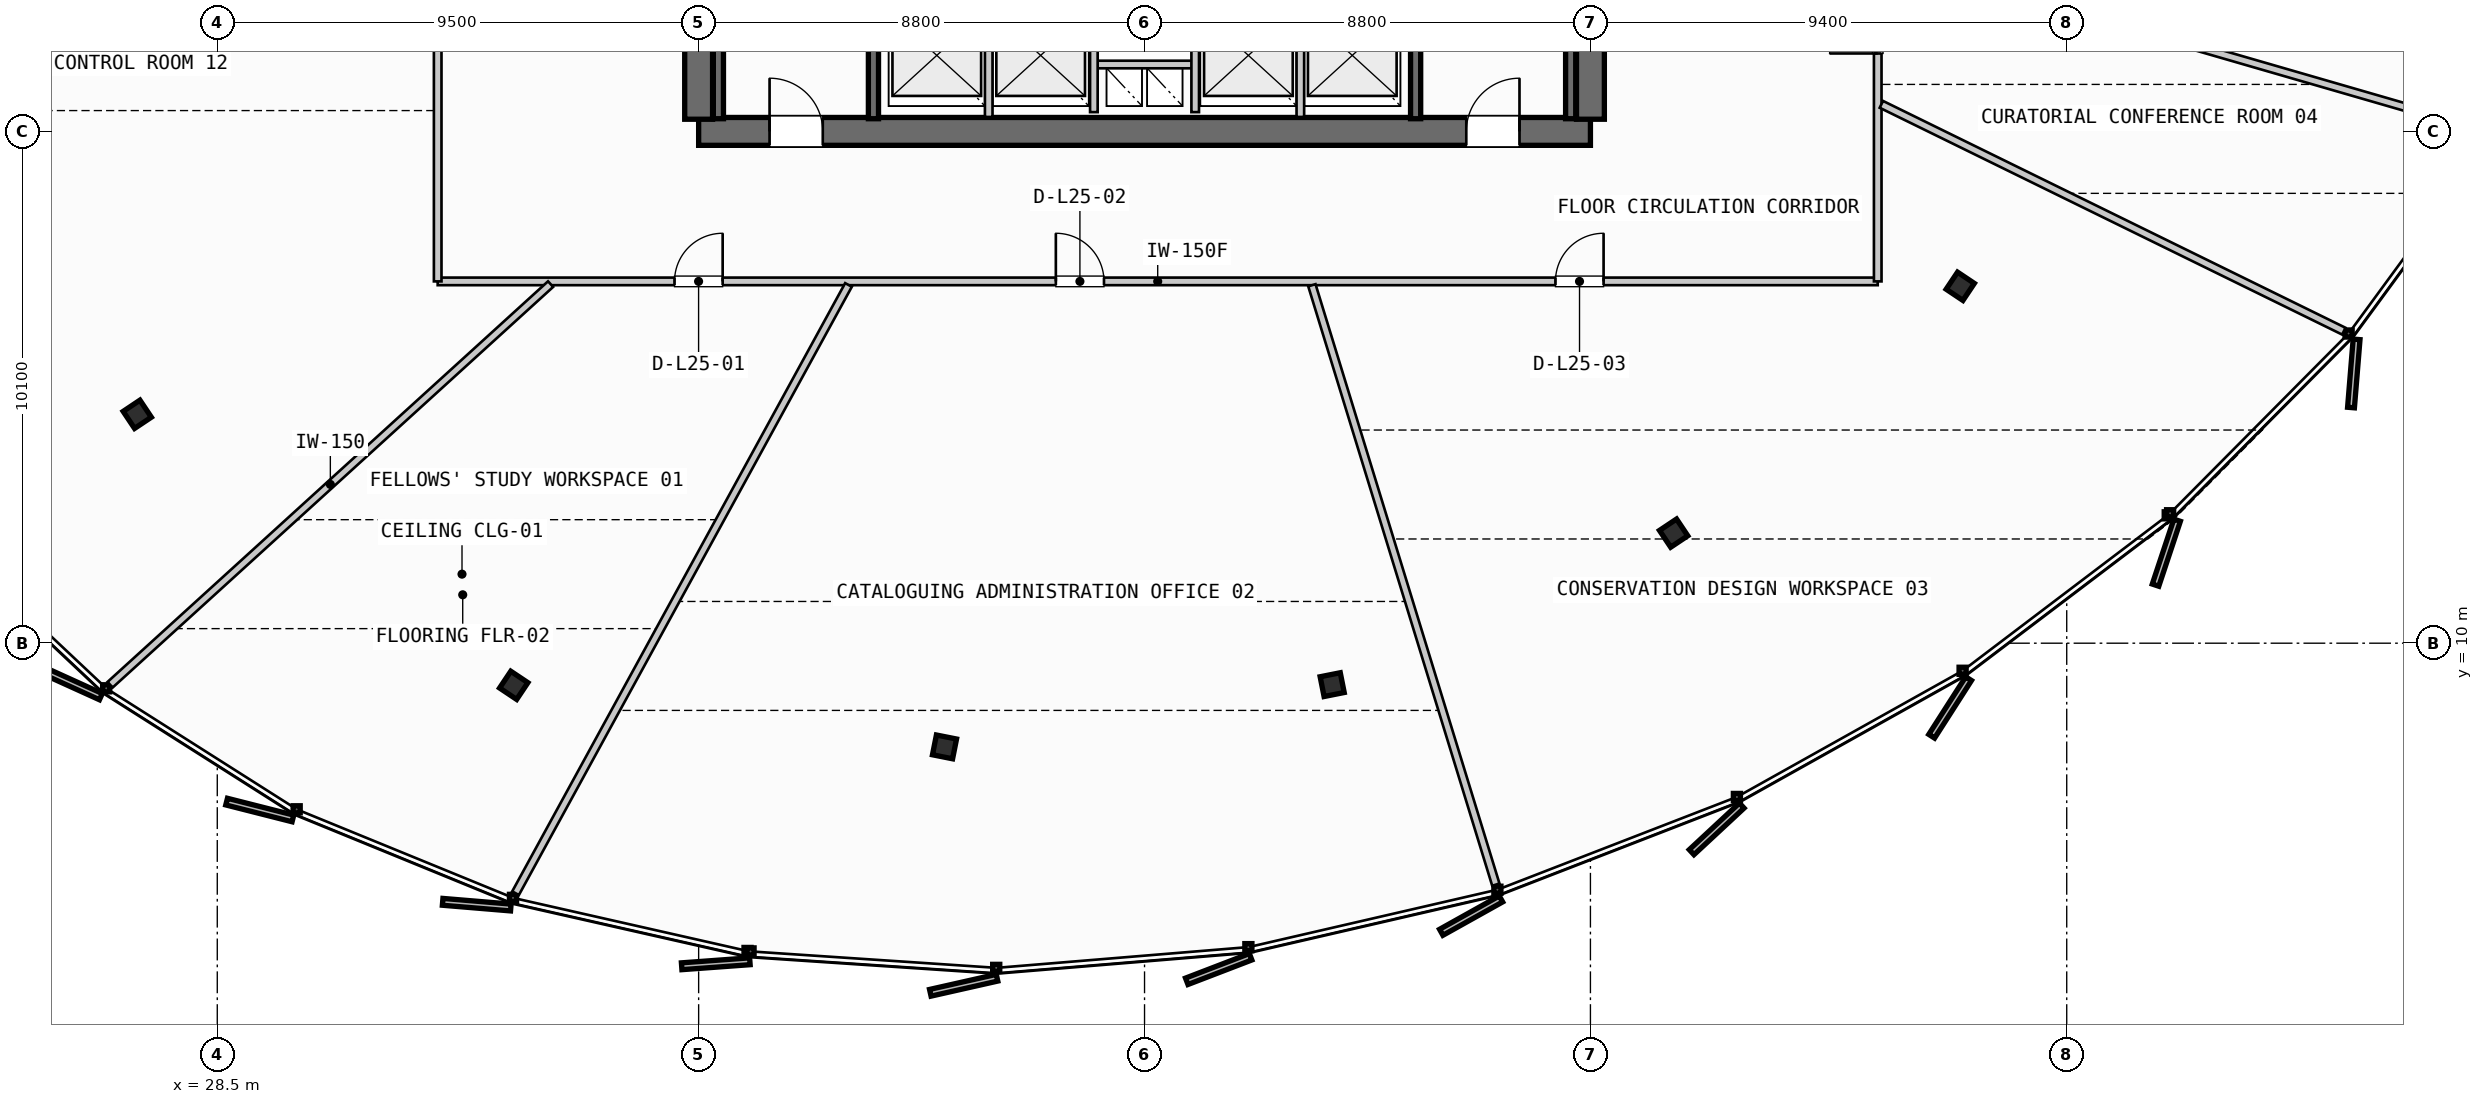
"""IFC4 building model, lengths in metres.
Left out: names, types, materials, properties, quantities, classifications, styles, units other than length and angle.
Written with IfcOpenShell. Run it as: python <this file> out.ifc"""

import sys

from ifc_helpers import new_model, si_unit, direction, frame, frame_2d, origin, origin_2d, place, context, subcontext, project, spatial, rectangle, i_section, extrude, source, transform, mapped, element, fill, save


model = new_model("IFC4")
c1 = context("Model", 3, precision=1e-05, world=origin(), true_north=direction((0.0, 1.0)))
c2 = subcontext(c1, "Body", "Model", "MODEL_VIEW")
j1 = project(units=[si_unit("LENGTHUNIT", "METRE"), si_unit("PLANEANGLEUNIT", "RADIAN")], contexts=[c1])
p1 = place(None, origin())
s1 = spatial("IfcSite", under=j1, at=p1, CompositionType="ELEMENT")
p2 = place(p1, origin())
s2 = spatial("IfcBuilding", under=s1, at=p2, CompositionType="ELEMENT")
p3 = place(p2, frame((0.0, 0.0, 103.6)))
s3 = spatial("IfcBuildingStorey", under=s2, at=p3, CompositionType="ELEMENT", Elevation=103.6)
p4 = place(p3, frame((38.0, 20.1, 0.0), z_axis=(0.0, 0.0, 1.0), x_axis=(1.0, 0.0, 0.0)))
e1 = element("IfcWall", 1, at=p4, inside=s3, PredefinedType="SHEAR", context=c2, shape_type="SweptSolid", body=[
    extrude(rectangle(XDim=17.6, YDim=0.55, at=frame_2d((8.8, 0.0))), origin(), (0.0, 0.0, 1.0), 3.35),
])
p5 = place(p4, frame((1.4, 0.0, 0.0)))
e2 = element("IfcOpeningElement", 2, at=p5, cuts=e1, PredefinedType="OPENING", context=c2, shape_type="SweptSolid", body=[
    extrude(rectangle(XDim=1.05, YDim=2.15, at=frame_2d((0.525, 1.075))), frame((0.0, 0.285, 0.0), z_axis=(0.0, -1.0, 0.0), x_axis=(1.0, 0.0, 0.0)), (0.0, 0.0, 1.0), 0.57),
])
p6 = place(p4, frame((15.15, 0.0, 0.0)))
e3 = element("IfcOpeningElement", 3, at=p6, cuts=e1, PredefinedType="OPENING", context=c2, shape_type="SweptSolid", body=[
    extrude(rectangle(XDim=1.05, YDim=2.15, at=frame_2d((0.525, 1.075))), frame((0.0, 0.285, 0.0), z_axis=(0.0, -1.0, 0.0), x_axis=(1.0, 0.0, 0.0)), (0.0, 0.0, 1.0), 0.57),
])
p7 = place(p3, frame((38.0, 35.26, 0.0), z_axis=(0.0, 0.0, 1.0), x_axis=(0.0, -1.0, 0.0)))
e4 = element("IfcWall", 4, at=p7, inside=s3, PredefinedType="SHEAR", context=c2, shape_type="SweptSolid", body=[
    extrude(rectangle(XDim=14.92, YDim=0.55, at=frame_2d((7.46, 0.0))), origin(), (0.0, 0.0, 1.0), 3.35),
])
p8 = place(p7, frame((5.21, 0.0, 0.0)))
e5 = element("IfcOpeningElement", 5, at=p8, cuts=e4, PredefinedType="OPENING", context=c2, shape_type="SweptSolid", body=[
    extrude(rectangle(XDim=1.1, YDim=2.2, at=frame_2d((0.55, 1.1))), frame((0.0, 0.285, 0.0), z_axis=(0.0, -1.0, 0.0), x_axis=(1.0, 0.0, 0.0)), (0.0, 0.0, 1.0), 0.57),
])
p9 = place(p3, frame((55.6, 20.34, 0.0), z_axis=(0.0, 0.0, 1.0), x_axis=(0.0, 1.0, 0.0)))
e6 = element("IfcWall", 6, at=p9, inside=s3, PredefinedType="SHEAR", context=c2, shape_type="SweptSolid", body=[
    extrude(rectangle(XDim=14.92, YDim=0.55, at=frame_2d((7.46, 0.0))), origin(), (0.0, 0.0, 1.0), 3.35),
])
p10 = place(p9, frame((12.71, 0.0, 0.0)))
e7 = element("IfcOpeningElement", 7, at=p10, cuts=e6, PredefinedType="OPENING", context=c2, shape_type="SweptSolid", body=[
    extrude(rectangle(XDim=1.05, YDim=2.15, at=frame_2d((0.525, 1.075))), frame((0.0, 0.285, 0.0), z_axis=(0.0, -1.0, 0.0), x_axis=(1.0, 0.0, 0.0)), (0.0, 0.0, 1.0), 0.57),
])
p11 = place(p9, frame((8.61, 0.0, 0.0)))
e8 = element("IfcOpeningElement", 8, at=p11, cuts=e6, PredefinedType="OPENING", context=c2, shape_type="SweptSolid", body=[
    extrude(rectangle(XDim=1.1, YDim=2.2, at=frame_2d((0.55, 1.1))), frame((0.0, 0.285, 0.0), z_axis=(0.0, -1.0, 0.0), x_axis=(1.0, 0.0, 0.0)), (0.0, 0.0, 1.0), 0.57),
])
m1 = source(origin(), c2, "Body", "SweptSolid", [
    extrude(i_section(OverallWidth=0.405, OverallDepth=0.398, WebThickness=0.035, FlangeThickness=0.056, FilletRadius=0.015, at=origin_2d()), origin(), (0.0, 0.0, 1.0), 3.35),
])
for number, where, z_axis, x_axis in (
    (9, (26.921, 14.517, 0.0), (0.0, 0.0, 1.0), (-0.831, -0.556, 0.0)),
    (10, (34.351, 9.168, 0.0), (0.0, 0.0, 1.0), (-0.556, -0.831, 0.0)),
    (11, (42.852, 7.954, 0.0), (0.0, 0.0, 1.0), (-0.195, -0.981, 0.0)),
    (12, (50.503, 9.182, 0.0), (0.0, 0.0, 1.0), (0.195, -0.981, 0.0)),
    (13, (57.242, 12.172, 0.0), (0.0, 0.0, 1.0), (0.556, -0.831, 0.0)),
    (14, (62.899, 17.043, 0.0), (0.0, 0.0, 1.0), (0.831, -0.556, 0.0)),
):
    element("IfcColumn", number, at=place(p3, frame(where, z_axis=z_axis, x_axis=x_axis)), inside=s3, PredefinedType="COLUMN", context=c2, shape_type="MappedRepresentation", body=[
        mapped(m1, transform((0.0, 0.0, 0.0), scale=1.0)),
    ])
for number, where, z_axis, x_axis in (
    (15, (41.45, 27.7, 0.0), (0.0, 0.0, 1.0), (0.0, -1.0, 0.0)),
    (16, (38.39, 20.35, 0.0), (0.0, 0.0, 1.0), (0.0, 1.0, 0.0)),
    (17, (55.21, 27.7, 0.0), (0.0, 0.0, 1.0), (0.0, -1.0, 0.0)),
    (18, (52.15, 20.35, 0.0), (0.0, 0.0, 1.0), (0.0, 1.0, 0.0)),
):
    element("IfcWall", number, at=place(p3, frame(where, z_axis=z_axis, x_axis=x_axis)), inside=s3, PredefinedType="SHEAR", context=c2, shape_type="SweptSolid", body=[
        extrude(rectangle(XDim=7.35, YDim=0.2, at=frame_2d((3.675, 0.0))), origin(), (0.0, 0.0, 1.0), 3.35),
    ])
p12 = place(p3, frame((45.8, 21.42, 0.0), z_axis=(0.0, 0.0, 1.0), x_axis=(1.0, 0.0, 0.0)))
e19 = element("IfcWall", 19, at=p12, inside=s3, PredefinedType="PARTITIONING", context=c2, shape_type="SweptSolid", body=[
    extrude(rectangle(XDim=2.0, YDim=0.15, at=frame_2d((1.0, 0.0))), origin(), (0.0, 0.0, 1.0), 2.28),
])
for number, where, z_axis, x_axis in (
    (20, (45.8, 20.48, 0.0), (0.0, 0.0, 1.0), (0.0, 1.0, 0.0)),
    (21, (47.8, 20.48, 0.0), (0.0, 0.0, 1.0), (0.0, 1.0, 0.0)),
):
    element("IfcWall", number, at=place(p3, frame(where, z_axis=z_axis, x_axis=x_axis)), inside=s3, PredefinedType="PARTITIONING", context=c2, shape_type="SweptSolid", body=[
        extrude(rectangle(XDim=2.24, YDim=0.15, at=frame_2d((1.12, 0.0))), origin(), (0.0, 0.0, 1.0), 2.28),
    ])
for number, where, z_axis, x_axis in (
    (22, (43.725, 20.385, 0.0), (0.0, 0.0, 1.0), (0.0, 1.0, 0.0)),
    (23, (49.875, 20.385, 0.0), (0.0, 0.0, 1.0), (0.0, 1.0, 0.0)),
):
    element("IfcWall", number, at=place(p3, frame(where, z_axis=z_axis, x_axis=x_axis)), inside=s3, PredefinedType="PARTITIONING", context=c2, shape_type="SweptSolid", body=[
        extrude(rectangle(XDim=2.345, YDim=0.15, at=frame_2d((1.172, 0.0))), origin(), (0.0, 0.0, 1.0), 2.28),
    ])
p13 = place(p3, frame((32.85, 17.14, 0.0), z_axis=(0.0, 0.0, 1.0), x_axis=(1.0, 0.0, 0.0)))
e24 = element("IfcWall", 24, at=p13, inside=s3, PredefinedType="PARTITIONING", context=c2, shape_type="SweptSolid", body=[
    extrude(rectangle(XDim=28.42, YDim=0.15, at=frame_2d((14.21, 0.0))), origin(), (0.0, 0.0, 1.0), 2.28),
])
p14 = place(p13, frame((4.674, 0.0, 0.0)))
e25 = element("IfcOpeningElement", 25, at=p14, cuts=e24, PredefinedType="OPENING", context=c2, shape_type="SweptSolid", body=[
    extrude(rectangle(XDim=0.95, YDim=2.15, at=frame_2d((0.475, 1.075))), frame((0.0, 0.085, 0.0), z_axis=(0.0, -1.0, 0.0), x_axis=(1.0, 0.0, 0.0)), (0.0, 0.0, 1.0), 0.17),
])
p15 = place(p13, frame((12.2, 0.0, 0.0)))
e26 = element("IfcOpeningElement", 26, at=p15, cuts=e24, PredefinedType="OPENING", context=c2, shape_type="SweptSolid", body=[
    extrude(rectangle(XDim=0.95, YDim=2.15, at=frame_2d((0.475, 1.075))), frame((0.0, 0.085, 0.0), z_axis=(0.0, -1.0, 0.0), x_axis=(1.0, 0.0, 0.0)), (0.0, 0.0, 1.0), 0.17),
])
p16 = place(p13, frame((22.06, 0.0, 0.0)))
e27 = element("IfcOpeningElement", 27, at=p16, cuts=e24, PredefinedType="OPENING", context=c2, shape_type="SweptSolid", body=[
    extrude(rectangle(XDim=0.95, YDim=2.15, at=frame_2d((0.475, 1.075))), frame((0.0, 0.085, 0.0), z_axis=(0.0, -1.0, 0.0), x_axis=(1.0, 0.0, 0.0)), (0.0, 0.0, 1.0), 0.17),
])
p17 = place(p3, frame((61.27, 17.14, 0.0), z_axis=(0.0, 0.0, 1.0), x_axis=(0.0, 1.0, 0.0)))
e28 = element("IfcWall", 28, at=p17, inside=s3, PredefinedType="PARTITIONING", context=c2, shape_type="SweptSolid", body=[
    extrude(rectangle(XDim=20.48, YDim=0.15, at=frame_2d((10.24, 0.0))), origin(), (0.0, 0.0, 1.0), 2.28),
])
p18 = place(p17, frame((4.498, 0.0, 0.0)))
e29 = element("IfcOpeningElement", 29, at=p18, cuts=e28, PredefinedType="OPENING", context=c2, shape_type="SweptSolid", body=[
    extrude(rectangle(XDim=0.95, YDim=2.15, at=frame_2d((0.475, 1.075))), frame((0.0, 0.085, 0.0), z_axis=(0.0, -1.0, 0.0), x_axis=(1.0, 0.0, 0.0)), (0.0, 0.0, 1.0), 0.17),
])
p19 = place(p17, frame((8.253, 0.0, 0.0)))
e30 = element("IfcOpeningElement", 30, at=p19, cuts=e28, PredefinedType="OPENING", context=c2, shape_type="SweptSolid", body=[
    extrude(rectangle(XDim=0.95, YDim=2.15, at=frame_2d((0.475, 1.075))), frame((0.0, 0.085, 0.0), z_axis=(0.0, -1.0, 0.0), x_axis=(1.0, 0.0, 0.0)), (0.0, 0.0, 1.0), 0.17),
])
p20 = place(p17, frame((14.984, 0.0, 0.0)))
e31 = element("IfcOpeningElement", 31, at=p20, cuts=e28, PredefinedType="OPENING", context=c2, shape_type="SweptSolid", body=[
    extrude(rectangle(XDim=0.95, YDim=2.15, at=frame_2d((0.475, 1.075))), frame((0.0, 0.085, 0.0), z_axis=(0.0, -1.0, 0.0), x_axis=(1.0, 0.0, 0.0)), (0.0, 0.0, 1.0), 0.17),
])
p21 = place(p3, frame((32.85, 37.62, 0.0), z_axis=(0.0, 0.0, 1.0), x_axis=(0.0, -1.0, 0.0)))
e32 = element("IfcWall", 32, at=p21, inside=s3, PredefinedType="PARTITIONING", context=c2, shape_type="SweptSolid", body=[
    extrude(rectangle(XDim=20.48, YDim=0.15, at=frame_2d((10.24, 0.0))), origin(), (0.0, 0.0, 1.0), 2.28),
])
p22 = place(p21, frame((4.729, 0.0, 0.0)))
e33 = element("IfcOpeningElement", 33, at=p22, cuts=e32, PredefinedType="OPENING", context=c2, shape_type="SweptSolid", body=[
    extrude(rectangle(XDim=0.95, YDim=2.15, at=frame_2d((0.475, 1.075))), frame((0.0, 0.085, 0.0), z_axis=(0.0, -1.0, 0.0), x_axis=(1.0, 0.0, 0.0)), (0.0, 0.0, 1.0), 0.17),
])
p23 = place(p21, frame((13.375, 0.0, 0.0)))
e34 = element("IfcOpeningElement", 34, at=p23, cuts=e32, PredefinedType="OPENING", context=c2, shape_type="SweptSolid", body=[
    extrude(rectangle(XDim=0.95, YDim=2.15, at=frame_2d((0.475, 1.075))), frame((0.0, 0.085, 0.0), z_axis=(0.0, -1.0, 0.0), x_axis=(1.0, 0.0, 0.0)), (0.0, 0.0, 1.0), 0.17),
])
p24 = place(p3, frame((35.078, 17.086, 0.0), z_axis=(0.0, 0.0, 1.0), x_axis=(-0.739815961322, -0.672809291979, 0.0)))
e35 = element("IfcWall", 35, at=p24, inside=s3, PredefinedType="PARTITIONING", context=c2, shape_type="SweptSolid", body=[
    extrude(rectangle(XDim=11.75, YDim=0.15, at=frame_2d((5.875, 0.0))), origin(), (0.0, 0.0, 1.0), 2.28),
])
p25 = place(p3, frame((40.958, 17.07, 0.0), z_axis=(0.0, 0.0, 1.0), x_axis=(-0.480174097986, -0.877173207311, 0.0)))
e36 = element("IfcWall", 36, at=p25, inside=s3, PredefinedType="PARTITIONING", context=c2, shape_type="SweptSolid", body=[
    extrude(rectangle(XDim=13.684, YDim=0.15, at=frame_2d((6.842, 0.0))), origin(), (0.0, 0.0, 1.0), 2.28),
])
p26 = place(p3, frame((50.103, 17.063, 0.0), z_axis=(0.0, 0.0, 1.0), x_axis=(0.293429940937, -0.955980580222, 0.0)))
e37 = element("IfcWall", 37, at=p26, inside=s3, PredefinedType="PARTITIONING", context=c2, shape_type="SweptSolid", body=[
    extrude(rectangle(XDim=12.373, YDim=0.15, at=frame_2d((6.187, 0.0))), origin(), (0.0, 0.0, 1.0), 2.28),
])
p27 = place(p3, frame((61.342, 20.634, 0.0), z_axis=(0.0, 0.0, 1.0), x_axis=(0.897844588606, -0.440312496656, 0.0)))
e38 = element("IfcWall", 38, at=p27, inside=s3, PredefinedType="PARTITIONING", context=c2, shape_type="SweptSolid", body=[
    extrude(rectangle(XDim=10.166, YDim=0.15, at=frame_2d((5.083, 0.0))), origin(), (0.0, 0.0, 1.0), 2.28),
])
p28 = place(p3, frame((61.347, 23.567, 0.0), z_axis=(0.0, 0.0, 1.0), x_axis=(0.960628313882, -0.277836719259, 0.0)))
e39 = element("IfcWall", 39, at=p28, inside=s3, PredefinedType="PARTITIONING", context=c2, shape_type="SweptSolid", body=[
    extrude(rectangle(XDim=12.507, YDim=0.15, at=frame_2d((6.253, 0.0))), origin(), (0.0, 0.0, 1.0), 2.28),
])
m2 = source(origin(), c2, "Body", "SweptSolid", [
    extrude(rectangle(XDim=1.05, YDim=2.15, at=frame_2d((0.525, 1.075))), frame((0.0, 0.025, 0.0), z_axis=(0.0, -1.0, 0.0), x_axis=(1.0, 0.0, 0.0)), (0.0, 0.0, 1.0), 0.05),
])
p29 = place(p5, origin())
e40 = element("IfcDoor", 40, at=p29, inside=s3, OperationType="SINGLE_SWING_LEFT", PredefinedType="DOOR", context=c2, shape_type="MappedRepresentation", body=[
    mapped(m2, transform((0.0, 0.0, 0.0), scale=1.0)),
])
fill(e2, e40)
p30 = place(p6, origin())
e41 = element("IfcDoor", 41, at=p30, inside=s3, OperationType="SINGLE_SWING_RIGHT", PredefinedType="DOOR", context=c2, shape_type="MappedRepresentation", body=[
    mapped(m2, transform((0.0, 0.0, 0.0), scale=1.0)),
])
fill(e3, e41)
m3 = source(origin(), c2, "Body", "SweptSolid", [
    extrude(rectangle(XDim=0.95, YDim=2.15, at=frame_2d((0.475, 1.075))), frame((0.0, 0.025, 0.0), z_axis=(0.0, -1.0, 0.0), x_axis=(1.0, 0.0, 0.0)), (0.0, 0.0, 1.0), 0.05),
])
p31 = place(p14, origin())
e42 = element("IfcDoor", 42, at=p31, inside=s3, OperationType="SINGLE_SWING_RIGHT", PredefinedType="DOOR", context=c2, shape_type="MappedRepresentation", body=[
    mapped(m3, transform((0.0, 0.0, 0.0), scale=1.0)),
])
fill(e25, e42)
p32 = place(p15, origin())
e43 = element("IfcDoor", 43, at=p32, inside=s3, OperationType="SINGLE_SWING_LEFT", PredefinedType="DOOR", context=c2, shape_type="MappedRepresentation", body=[
    mapped(m3, transform((0.0, 0.0, 0.0), scale=1.0)),
])
fill(e26, e43)
p33 = place(p16, origin())
e44 = element("IfcDoor", 44, at=p33, inside=s3, OperationType="SINGLE_SWING_RIGHT", PredefinedType="DOOR", context=c2, shape_type="MappedRepresentation", body=[
    mapped(m3, transform((0.0, 0.0, 0.0), scale=1.0)),
])
fill(e27, e44)
p34 = place(p18, origin())
e45 = element("IfcDoor", 45, at=p34, inside=s3, OperationType="SINGLE_SWING_LEFT", PredefinedType="DOOR", context=c2, shape_type="MappedRepresentation", body=[
    mapped(m3, transform((0.0, 0.0, 0.0), scale=1.0)),
])
fill(e29, e45)
save(model, sys.argv[1])
